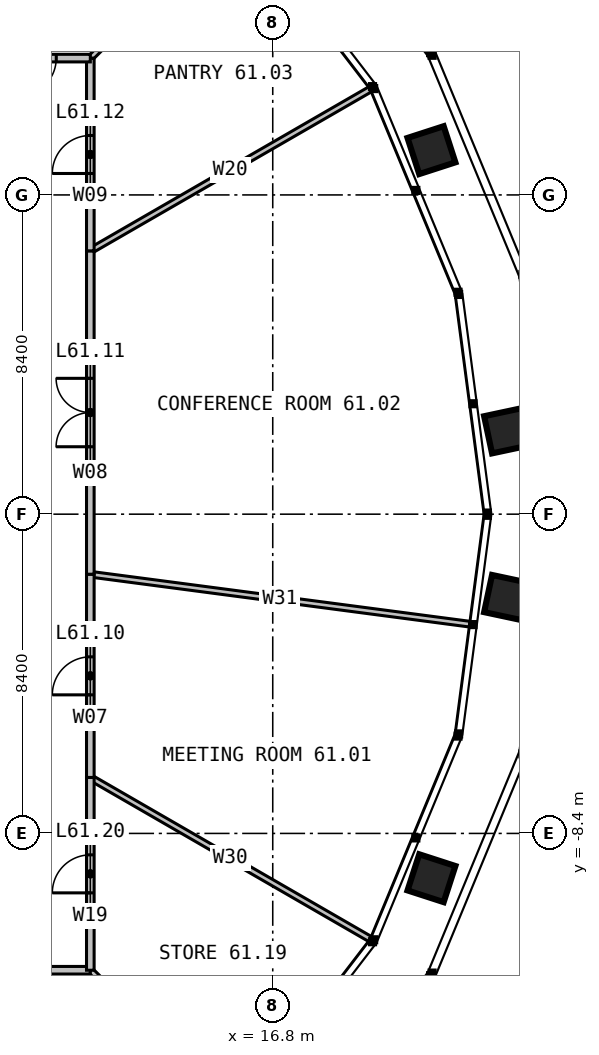
"""IFC4 building model, lengths in metres.
Left out: names, types, materials, properties, quantities, classifications, styles, units other than length and angle.
Written with IfcOpenShell. Run it as: python <this file> out.ifc"""

import sys

from ifc_helpers import new_model, si_unit, direction, frame, frame_2d, origin, place, context, subcontext, project, spatial, rectangle, extrude, element, fill, save


model = new_model("IFC4")
c1 = context("Model", 3, precision=1e-05, world=origin(), true_north=direction((0.0, 1.0)))
c2 = subcontext(c1, "Body", "Model", "MODEL_VIEW")
j1 = project(units=[si_unit("LENGTHUNIT", "METRE"), si_unit("PLANEANGLEUNIT", "RADIAN")], contexts=[c1])
p1 = place(None, origin())
s1 = spatial("IfcSite", under=j1, at=p1, CompositionType="ELEMENT")
p2 = place(p1, origin())
s2 = spatial("IfcBuilding", under=s1, at=p2, CompositionType="ELEMENT")
p3 = place(p2, frame((0.0, 0.0, 252.0)))
s3 = spatial("IfcBuildingStorey", under=s2, at=p3, CompositionType="ELEMENT", Elevation=252.0)
p4 = place(p3, frame((12.0, -6.928, 0.0), z_axis=(0.0, 0.0, 1.0), x_axis=(0.866026401553, -0.49999827181, 0.0)))
e1 = element("IfcWall", 1, at=p4, inside=s3, PredefinedType="PARTITIONING", context=c2, shape_type="SweptSolid", body=[
    extrude(rectangle(XDim=8.505, YDim=0.15, at=frame_2d((4.252, 0.0))), origin(), (0.0, 0.0, 1.0), 2.79),
])
p5 = place(p3, frame((12.0, -1.58, 0.0), z_axis=(0.0, 0.0, 1.0), x_axis=(0.991444304105, -0.130530425027, 0.0)))
e2 = element("IfcWall", 2, at=p5, inside=s3, PredefinedType="PARTITIONING", context=c2, shape_type="SweptSolid", body=[
    extrude(rectangle(XDim=10.066, YDim=0.15, at=frame_2d((5.033, 0.0))), origin(), (0.0, 0.0, 1.0), 2.79),
])
p6 = place(p3, frame((12.0, 6.928, 0.0), z_axis=(0.0, 0.0, 1.0), x_axis=(0.866026401553, 0.49999827181, 0.0)))
e3 = element("IfcWall", 3, at=p6, inside=s3, PredefinedType="PARTITIONING", context=c2, shape_type="SweptSolid", body=[
    extrude(rectangle(XDim=8.505, YDim=0.15, at=frame_2d((4.252, 0.0))), origin(), (0.0, 0.0, 1.0), 2.79),
])
p7 = place(p3, frame((12.0, 12.0, 0.0), z_axis=(0.0, 0.0, 1.0), x_axis=(0.707106781187, 0.707106781187, 0.0)))
e4 = element("IfcWall", 4, at=p7, inside=s3, PredefinedType="PARTITIONING", context=c2, shape_type="SweptSolid", body=[
    extrude(rectangle(XDim=5.391, YDim=0.15, at=frame_2d((2.695, 0.0))), origin(), (0.0, 0.0, 1.0), 2.79),
])
p8 = place(p3, frame((9.208, 12.0, 0.0), z_axis=(0.0, 0.0, 1.0), x_axis=(0.608742186743, 0.79336810503, 0.0)))
e5 = element("IfcWall", 5, at=p8, inside=s3, PredefinedType="PARTITIONING", context=c2, shape_type="SweptSolid", body=[
    extrude(rectangle(XDim=7.044, YDim=0.15, at=frame_2d((3.522, 0.0))), origin(), (0.0, 0.0, 1.0), 2.79),
])
for number, where, z_axis, x_axis in (
    (6, (6.928, 12.0, 0.0), (0.0, 0.0, 1.0), (0.5, 0.866, 0.0)),
    (7, (6.928, -12.0, 0.0), (0.0, 0.0, 1.0), (0.5, -0.866, 0.0)),
):
    element("IfcWall", number, at=place(p3, frame(where, z_axis=z_axis, x_axis=x_axis)), inside=s3, PredefinedType="PARTITIONING", context=c2, shape_type="SweptSolid", body=[
        extrude(rectangle(XDim=8.505, YDim=0.15, at=frame_2d((4.252, 0.0))), origin(), (0.0, 0.0, 1.0), 2.79),
    ])
p9 = place(p3, frame((12.0, -12.0, 0.0), z_axis=(0.0, 0.0, 1.0), x_axis=(0.707106781187, -0.707106781187, 0.0)))
e8 = element("IfcWall", 8, at=p9, inside=s3, PredefinedType="PARTITIONING", context=c2, shape_type="SweptSolid", body=[
    extrude(rectangle(XDim=5.391, YDim=0.15, at=frame_2d((2.695, 0.0))), origin(), (0.0, 0.0, 1.0), 2.79),
])
p10 = place(p3, frame((12.0, -6.928, 0.0), z_axis=(0.0, 0.0, 1.0), x_axis=(0.0, 1.0, 0.0)))
e9 = element("IfcWall", 9, at=p10, inside=s3, PredefinedType="PARTITIONING", context=c2, shape_type="SweptSolid", body=[
    extrude(rectangle(XDim=5.348, YDim=0.2, at=frame_2d((2.674, 0.0))), origin(), (0.0, 0.0, 1.0), 3.8),
])
p11 = place(p10, frame((2.174, 0.0, 0.0)))
e10 = element("IfcOpeningElement", 10, at=p11, cuts=e9, PredefinedType="OPENING", context=c2, shape_type="SweptSolid", body=[
    extrude(rectangle(XDim=1.0, YDim=2.2, at=frame_2d((0.5, 1.1))), frame((0.0, 0.11, 0.0), z_axis=(0.0, -1.0, 0.0), x_axis=(1.0, 0.0, 0.0)), (0.0, 0.0, 1.0), 0.22),
])
p12 = place(p3, frame((12.0, -1.58, 0.0), z_axis=(0.0, 0.0, 1.0), x_axis=(0.0, 1.0, 0.0)))
e11 = element("IfcWall", 11, at=p12, inside=s3, PredefinedType="PARTITIONING", context=c2, shape_type="SweptSolid", body=[
    extrude(rectangle(XDim=8.508, YDim=0.2, at=frame_2d((4.254, 0.0))), origin(), (0.0, 0.0, 1.0), 3.8),
])
p13 = place(p12, frame((3.354, 0.0, 0.0)))
e12 = element("IfcOpeningElement", 12, at=p13, cuts=e11, PredefinedType="OPENING", context=c2, shape_type="SweptSolid", body=[
    extrude(rectangle(XDim=1.8, YDim=2.2, at=frame_2d((0.9, 1.1))), frame((0.0, 0.11, 0.0), z_axis=(0.0, -1.0, 0.0), x_axis=(1.0, 0.0, 0.0)), (0.0, 0.0, 1.0), 0.22),
])
p14 = place(p3, frame((12.0, 6.928, 0.0), z_axis=(0.0, 0.0, 1.0), x_axis=(0.0, 1.0, 0.0)))
e13 = element("IfcWall", 13, at=p14, inside=s3, PredefinedType="PARTITIONING", context=c2, shape_type="SweptSolid", body=[
    extrude(rectangle(XDim=5.072, YDim=0.2, at=frame_2d((2.536, 0.0))), origin(), (0.0, 0.0, 1.0), 3.8),
])
p15 = place(p14, frame((2.036, 0.0, 0.0)))
e14 = element("IfcOpeningElement", 14, at=p15, cuts=e13, PredefinedType="OPENING", context=c2, shape_type="SweptSolid", body=[
    extrude(rectangle(XDim=1.0, YDim=2.2, at=frame_2d((0.5, 1.1))), frame((0.0, 0.11, 0.0), z_axis=(0.0, -1.0, 0.0), x_axis=(1.0, 0.0, 0.0)), (0.0, 0.0, 1.0), 0.22),
])
p16 = place(p3, frame((12.0, 12.0, 0.0), z_axis=(0.0, 0.0, 1.0), x_axis=(-1.0, 0.0, 0.0)))
e15 = element("IfcWall", 15, at=p16, inside=s3, PredefinedType="PARTITIONING", context=c2, shape_type="SweptSolid", body=[
    extrude(rectangle(XDim=2.792, YDim=0.2, at=frame_2d((1.396, 0.0))), origin(), (0.0, 0.0, 1.0), 3.8),
])
p17 = place(p16, frame((0.896, 0.0, 0.0)))
e16 = element("IfcOpeningElement", 16, at=p17, cuts=e15, PredefinedType="OPENING", context=c2, shape_type="SweptSolid", body=[
    extrude(rectangle(XDim=1.0, YDim=2.2, at=frame_2d((0.5, 1.1))), frame((0.0, 0.11, 0.0), z_axis=(0.0, -1.0, 0.0), x_axis=(1.0, 0.0, 0.0)), (0.0, 0.0, 1.0), 0.22),
])
p18 = place(p3, frame((6.928, -12.0, 0.0), z_axis=(0.0, 0.0, 1.0), x_axis=(1.0, 0.0, 0.0)))
e17 = element("IfcWall", 17, at=p18, inside=s3, PredefinedType="PARTITIONING", context=c2, shape_type="SweptSolid", body=[
    extrude(rectangle(XDim=5.072, YDim=0.2, at=frame_2d((2.536, 0.0))), origin(), (0.0, 0.0, 1.0), 3.8),
])
p19 = place(p18, frame((2.036, 0.0, 0.0)))
e18 = element("IfcOpeningElement", 18, at=p19, cuts=e17, PredefinedType="OPENING", context=c2, shape_type="SweptSolid", body=[
    extrude(rectangle(XDim=1.0, YDim=2.2, at=frame_2d((0.5, 1.1))), frame((0.0, 0.11, 0.0), z_axis=(0.0, -1.0, 0.0), x_axis=(1.0, 0.0, 0.0)), (0.0, 0.0, 1.0), 0.22),
])
p20 = place(p3, frame((12.0, -12.0, 0.0), z_axis=(0.0, 0.0, 1.0), x_axis=(0.0, 1.0, 0.0)))
e19 = element("IfcWall", 19, at=p20, inside=s3, PredefinedType="PARTITIONING", context=c2, shape_type="SweptSolid", body=[
    extrude(rectangle(XDim=5.072, YDim=0.2, at=frame_2d((2.536, 0.0))), origin(), (0.0, 0.0, 1.0), 3.8),
])
p21 = place(p20, frame((2.036, 0.0, 0.0)))
e20 = element("IfcOpeningElement", 20, at=p21, cuts=e19, PredefinedType="OPENING", context=c2, shape_type="SweptSolid", body=[
    extrude(rectangle(XDim=1.0, YDim=2.2, at=frame_2d((0.5, 1.1))), frame((0.0, 0.11, 0.0), z_axis=(0.0, -1.0, 0.0), x_axis=(1.0, 0.0, 0.0)), (0.0, 0.0, 1.0), 0.22),
])
p22 = place(p11, origin())
e21 = element("IfcDoor", 21, at=p22, inside=s3, OperationType="SINGLE_SWING_LEFT", PredefinedType="DOOR", context=c2, shape_type="SweptSolid", body=[
    extrude(rectangle(XDim=1.0, YDim=2.2, at=frame_2d((0.5, 1.1))), frame((0.0, 0.025, 0.0), z_axis=(0.0, -1.0, 0.0), x_axis=(1.0, 0.0, 0.0)), (0.0, 0.0, 1.0), 0.05),
])
fill(e10, e21)
p23 = place(p13, origin())
e22 = element("IfcDoor", 22, at=p23, inside=s3, OperationType="DOUBLE_DOOR_SINGLE_SWING", PredefinedType="DOOR", context=c2, shape_type="SweptSolid", body=[
    extrude(rectangle(XDim=1.8, YDim=2.2, at=frame_2d((0.9, 1.1))), frame((0.0, 0.025, 0.0), z_axis=(0.0, -1.0, 0.0), x_axis=(1.0, 0.0, 0.0)), (0.0, 0.0, 1.0), 0.05),
])
fill(e12, e22)
p24 = place(p15, origin())
e23 = element("IfcDoor", 23, at=p24, inside=s3, OperationType="SINGLE_SWING_LEFT", PredefinedType="DOOR", context=c2, shape_type="SweptSolid", body=[
    extrude(rectangle(XDim=1.0, YDim=2.2, at=frame_2d((0.5, 1.1))), frame((0.0, 0.025, 0.0), z_axis=(0.0, -1.0, 0.0), x_axis=(1.0, 0.0, 0.0)), (0.0, 0.0, 1.0), 0.05),
])
fill(e14, e23)
p25 = place(p17, origin())
e24 = element("IfcDoor", 24, at=p25, inside=s3, OperationType="SINGLE_SWING_RIGHT", PredefinedType="DOOR", context=c2, shape_type="SweptSolid", body=[
    extrude(rectangle(XDim=1.0, YDim=2.2, at=frame_2d((0.5, 1.1))), frame((0.0, 0.025, 0.0), z_axis=(0.0, -1.0, 0.0), x_axis=(1.0, 0.0, 0.0)), (0.0, 0.0, 1.0), 0.05),
])
fill(e16, e24)
p26 = place(p21, origin())
e25 = element("IfcDoor", 25, at=p26, inside=s3, OperationType="SINGLE_SWING_LEFT", PredefinedType="DOOR", context=c2, shape_type="SweptSolid", body=[
    extrude(rectangle(XDim=1.0, YDim=2.2, at=frame_2d((0.5, 1.1))), frame((0.0, 0.025, 0.0), z_axis=(0.0, -1.0, 0.0), x_axis=(1.0, 0.0, 0.0)), (0.0, 0.0, 1.0), 0.05),
])
fill(e20, e25)
save(model, sys.argv[1])
